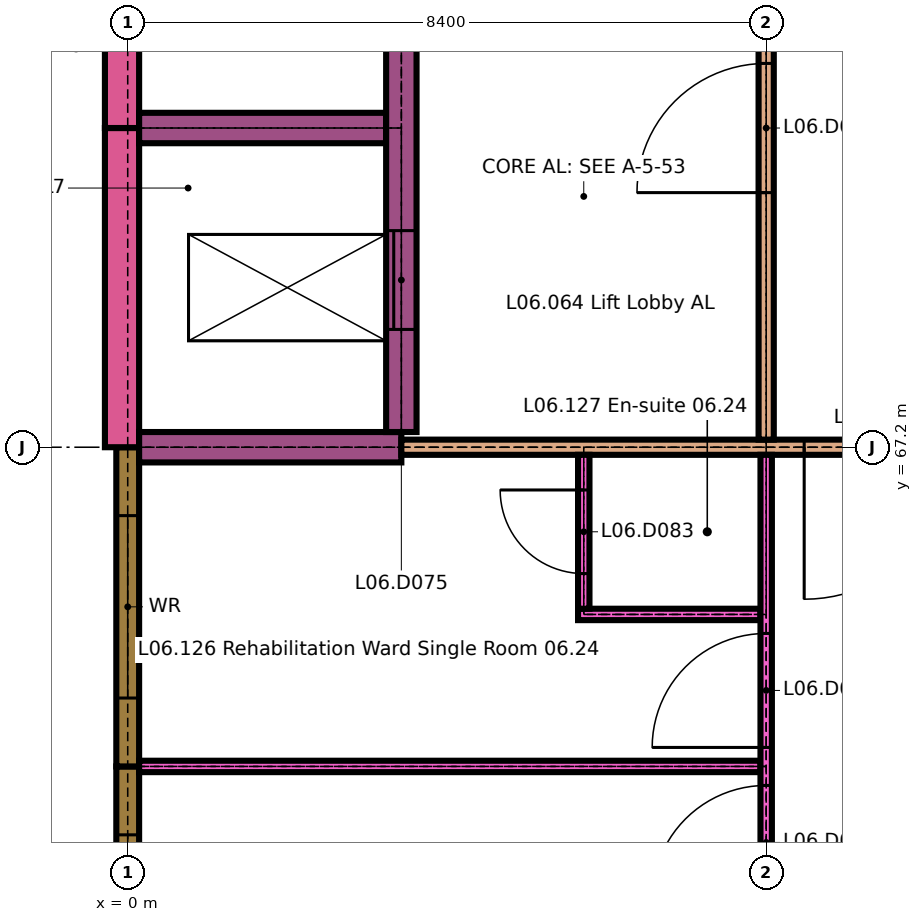
"""IFC4 building model, lengths in metres.
Left out: names, types, materials, properties, quantities, classifications, styles, units other than length and angle.
Written with IfcOpenShell. Run it as: python <this file> out.ifc"""

import sys

from ifc_helpers import new_model, si_unit, direction, frame, frame_2d, origin, place, context, subcontext, project, spatial, rectangle, extrude, element, fill, save


model = new_model("IFC4")
c1 = context("Model", 3, precision=1e-05, world=origin(), true_north=direction((0.0, 1.0)))
c2 = subcontext(c1, "Body", "Model", "MODEL_VIEW")
j1 = project(units=[si_unit("LENGTHUNIT", "METRE"), si_unit("PLANEANGLEUNIT", "RADIAN")], contexts=[c1])
p1 = place(None, origin())
s1 = spatial("IfcSite", under=j1, at=p1, CompositionType="ELEMENT")
p2 = place(p1, origin())
s2 = spatial("IfcBuilding", under=s1, at=p2, CompositionType="ELEMENT")
p3 = place(p2, frame((0.0, 0.0, 26.1)))
s3 = spatial("IfcBuildingStorey", under=s2, at=p3, CompositionType="ELEMENT", Elevation=26.1)
p4 = place(p3, frame((0.0, 59.15, 0.0), z_axis=(0.0, 0.0, 1.0), x_axis=(0.0, 1.0, 0.0)))
e1 = element("IfcWall", 1, at=p4, inside=s3, PredefinedType="SOLIDWALL", context=c2, shape_type="SweptSolid", body=[
    extrude(rectangle(XDim=3.85, YDim=0.3, at=frame_2d((1.925, 0.0))), origin(), (0.0, 0.0, 1.0), 2.9),
])
p5 = place(p4, frame((0.55, 0.0, 0.6)))
e2 = element("IfcOpeningElement", 2, at=p5, cuts=e1, PredefinedType="OPENING", context=c2, shape_type="SweptSolid", body=[
    extrude(rectangle(XDim=2.4, YDim=1.8, at=frame_2d((1.2, 0.9))), frame((0.0, 0.16, 0.0), z_axis=(0.0, -1.0, 0.0), x_axis=(1.0, 0.0, 0.0)), (0.0, 0.0, 1.0), 0.32),
])
p6 = place(p3, frame((0.0, 63.0, 0.0), z_axis=(0.0, 0.0, 1.0), x_axis=(0.0, 1.0, 0.0)))
e3 = element("IfcWall", 3, at=p6, inside=s3, PredefinedType="SOLIDWALL", context=c2, shape_type="SweptSolid", body=[
    extrude(rectangle(XDim=4.2, YDim=0.3, at=frame_2d((2.1, 0.0))), origin(), (0.0, 0.0, 1.0), 2.9),
])
p7 = place(p6, frame((0.9, 0.0, 0.6)))
e4 = element("IfcOpeningElement", 4, at=p7, cuts=e3, PredefinedType="OPENING", context=c2, shape_type="SweptSolid", body=[
    extrude(rectangle(XDim=2.4, YDim=1.8, at=frame_2d((1.2, 0.9))), frame((0.0, 0.16, 0.0), z_axis=(0.0, -1.0, 0.0), x_axis=(1.0, 0.0, 0.0)), (0.0, 0.0, 1.0), 0.32),
])
p8 = place(p3, frame((-0.075, 67.2, 0.0), z_axis=(0.0, 0.0, 1.0), x_axis=(0.0, 1.0, 0.0)))
e5 = element("IfcWall", 5, at=p8, inside=s3, PredefinedType="SOLIDWALL", context=c2, shape_type="SweptSolid", body=[
    extrude(rectangle(XDim=4.2, YDim=0.45, at=frame_2d((2.1, 0.0))), origin(), (0.0, 0.0, 1.0), 3.3),
])
p9 = place(p3, frame((-0.075, 71.4, 0.0), z_axis=(0.0, 0.0, 1.0), x_axis=(0.0, 1.0, 0.0)))
e6 = element("IfcWall", 6, at=p9, inside=s3, PredefinedType="SOLIDWALL", context=c2, shape_type="SweptSolid", body=[
    extrude(rectangle(XDim=4.2, YDim=0.45, at=frame_2d((2.1, 0.0))), origin(), (0.0, 0.0, 1.0), 3.3),
])
p10 = place(p3, frame((0.15, 63.0, 0.0), z_axis=(0.0, 0.0, 1.0), x_axis=(1.0, 0.0, 0.0)))
e7 = element("IfcWall", 7, at=p10, inside=s3, PredefinedType="PARTITIONING", context=c2, shape_type="SweptSolid", body=[
    extrude(rectangle(XDim=8.175, YDim=0.15, at=frame_2d((4.087, 0.0))), origin(), (0.0, 0.0, 1.0), 3.3),
])
p11 = place(p3, frame((5.925, 65.0, 0.0), z_axis=(0.0, 0.0, 1.0), x_axis=(1.0, 0.0, 0.0)))
e8 = element("IfcWall", 8, at=p11, inside=s3, PredefinedType="PARTITIONING", context=c2, shape_type="SweptSolid", body=[
    extrude(rectangle(XDim=2.4, YDim=0.15, at=frame_2d((1.2, 0.0))), origin(), (0.0, 0.0, 1.0), 3.3),
])
p12 = place(p3, frame((0.15, 67.2, 0.0), z_axis=(0.0, 0.0, 1.0), x_axis=(1.0, 0.0, 0.0)))
e9 = element("IfcWall", 9, at=p12, inside=s3, PredefinedType="SHEAR", context=c2, shape_type="SweptSolid", body=[
    extrude(rectangle(XDim=3.45, YDim=0.4, at=frame_2d((1.725, 0.0))), origin(), (0.0, 0.0, 1.0), 3.3),
])
p13 = place(p3, frame((3.6, 67.2, 0.0), z_axis=(0.0, 0.0, 1.0), x_axis=(1.0, 0.0, 0.0)))
e10 = element("IfcWall", 10, at=p13, inside=s3, PredefinedType="PARTITIONING", context=c2, shape_type="SweptSolid", body=[
    extrude(rectangle(XDim=12.85, YDim=0.2, at=frame_2d((6.425, 0.0))), origin(), (0.0, 0.0, 1.0), 3.3),
])
p14 = place(p13, frame((5.3, 0.0, 0.0)))
e11 = element("IfcOpeningElement", 11, at=p14, cuts=e10, PredefinedType="OPENING", context=c2, shape_type="SweptSolid", body=[
    extrude(rectangle(XDim=2.0, YDim=2.4, at=frame_2d((1.0, 1.2))), frame((0.0, 0.11, 0.0), z_axis=(0.0, -1.0, 0.0), x_axis=(1.0, 0.0, 0.0)), (0.0, 0.0, 1.0), 0.22),
])
p15 = place(p13, frame((10.525, 0.0, 0.0)))
e12 = element("IfcOpeningElement", 12, at=p15, cuts=e10, PredefinedType="OPENING", context=c2, shape_type="SweptSolid", body=[
    extrude(rectangle(XDim=2.0, YDim=2.4, at=frame_2d((1.0, 1.2))), frame((0.0, 0.11, 0.0), z_axis=(0.0, -1.0, 0.0), x_axis=(1.0, 0.0, 0.0)), (0.0, 0.0, 1.0), 0.22),
])
p16 = place(p3, frame((0.15, 71.4, 0.0), z_axis=(0.0, 0.0, 1.0), x_axis=(1.0, 0.0, 0.0)))
e13 = element("IfcWall", 13, at=p16, inside=s3, PredefinedType="SHEAR", context=c2, shape_type="SweptSolid", body=[
    extrude(rectangle(XDim=3.25, YDim=0.4, at=frame_2d((1.625, 0.0))), origin(), (0.0, 0.0, 1.0), 3.3),
])
p17 = place(p3, frame((3.6, 67.4, 0.0), z_axis=(0.0, 0.0, 1.0), x_axis=(0.0, 1.0, 0.0)))
e14 = element("IfcWall", 14, at=p17, inside=s3, PredefinedType="SHEAR", context=c2, shape_type="SweptSolid", body=[
    extrude(rectangle(XDim=8.0, YDim=0.4, at=frame_2d((4.0, 0.0))), origin(), (0.0, 0.0, 1.0), 3.3),
])
p18 = place(p17, frame((1.35, 0.0, 0.0)))
e15 = element("IfcOpeningElement", 15, at=p18, cuts=e14, PredefinedType="OPENING", context=c2, shape_type="SweptSolid", body=[
    extrude(rectangle(XDim=1.3, YDim=2.1, at=frame_2d((0.65, 1.05))), frame((0.0, 0.21, 0.0), z_axis=(0.0, -1.0, 0.0), x_axis=(1.0, 0.0, 0.0)), (0.0, 0.0, 1.0), 0.42),
])
p19 = place(p17, frame((5.45, 0.0, 0.0)))
e16 = element("IfcOpeningElement", 16, at=p19, cuts=e14, PredefinedType="OPENING", context=c2, shape_type="SweptSolid", body=[
    extrude(rectangle(XDim=1.1, YDim=2.1, at=frame_2d((0.55, 1.05))), frame((0.0, 0.21, 0.0), z_axis=(0.0, -1.0, 0.0), x_axis=(1.0, 0.0, 0.0)), (0.0, 0.0, 1.0), 0.42),
])
p20 = place(p3, frame((6.0, 65.075, 0.0), z_axis=(0.0, 0.0, 1.0), x_axis=(0.0, 1.0, 0.0)))
e17 = element("IfcWall", 17, at=p20, inside=s3, PredefinedType="PARTITIONING", context=c2, shape_type="SweptSolid", body=[
    extrude(rectangle(XDim=2.025, YDim=0.15, at=frame_2d((1.013, 0.0))), origin(), (0.0, 0.0, 1.0), 3.3),
])
p21 = place(p20, frame((0.462, 0.0, 0.0)))
e18 = element("IfcOpeningElement", 18, at=p21, cuts=e17, PredefinedType="OPENING", context=c2, shape_type="SweptSolid", body=[
    extrude(rectangle(XDim=1.1, YDim=2.1, at=frame_2d((0.55, 1.05))), frame((0.0, 0.085, 0.0), z_axis=(0.0, -1.0, 0.0), x_axis=(1.0, 0.0, 0.0)), (0.0, 0.0, 1.0), 0.17),
])
p22 = place(p3, frame((8.4, 59.15, 0.0), z_axis=(0.0, 0.0, 1.0), x_axis=(0.0, 1.0, 0.0)))
e19 = element("IfcWall", 19, at=p22, inside=s3, PredefinedType="PARTITIONING", context=c2, shape_type="SweptSolid", body=[
    extrude(rectangle(XDim=7.95, YDim=0.15, at=frame_2d((3.975, 0.0))), origin(), (0.0, 0.0, 1.0), 3.3),
])
p23 = place(p22, frame((2.1, 0.0, 0.0)))
e20 = element("IfcOpeningElement", 20, at=p23, cuts=e19, PredefinedType="OPENING", context=c2, shape_type="SweptSolid", body=[
    extrude(rectangle(XDim=1.5, YDim=2.4, at=frame_2d((0.75, 1.2))), frame((0.0, 0.085, 0.0), z_axis=(0.0, -1.0, 0.0), x_axis=(1.0, 0.0, 0.0)), (0.0, 0.0, 1.0), 0.17),
])
p24 = place(p22, frame((4.1, 0.0, 0.0)))
e21 = element("IfcOpeningElement", 21, at=p24, cuts=e19, PredefinedType="OPENING", context=c2, shape_type="SweptSolid", body=[
    extrude(rectangle(XDim=1.5, YDim=2.4, at=frame_2d((0.75, 1.2))), frame((0.0, 0.085, 0.0), z_axis=(0.0, -1.0, 0.0), x_axis=(1.0, 0.0, 0.0)), (0.0, 0.0, 1.0), 0.17),
])
p25 = place(p3, frame((8.4, 67.3, 0.0), z_axis=(0.0, 0.0, 1.0), x_axis=(0.0, 1.0, 0.0)))
e22 = element("IfcWall", 22, at=p25, inside=s3, PredefinedType="PARTITIONING", context=c2, shape_type="SweptSolid", body=[
    extrude(rectangle(XDim=8.2, YDim=0.2, at=frame_2d((4.1, 0.0))), origin(), (0.0, 0.0, 1.0), 3.3),
])
p26 = place(p25, frame((3.25, 0.0, 0.0)))
e23 = element("IfcOpeningElement", 23, at=p26, cuts=e22, PredefinedType="OPENING", context=c2, shape_type="SweptSolid", body=[
    extrude(rectangle(XDim=1.7, YDim=2.4, at=frame_2d((0.85, 1.2))), frame((0.0, 0.11, 0.0), z_axis=(0.0, -1.0, 0.0), x_axis=(1.0, 0.0, 0.0)), (0.0, 0.0, 1.0), 0.22),
])
p27 = place(p5, origin())
e24 = element("IfcWindow", 24, at=p27, inside=s3, PartitioningType="DOUBLE_PANEL_VERTICAL", PredefinedType="WINDOW", context=c2, shape_type="SweptSolid", body=[
    extrude(rectangle(XDim=2.4, YDim=1.8, at=frame_2d((1.2, 0.9))), frame((0.0, 0.03, 0.0), z_axis=(0.0, -1.0, 0.0), x_axis=(1.0, 0.0, 0.0)), (0.0, 0.0, 1.0), 0.06),
])
fill(e2, e24)
p28 = place(p7, origin())
e25 = element("IfcWindow", 25, at=p28, inside=s3, PartitioningType="DOUBLE_PANEL_VERTICAL", PredefinedType="WINDOW", context=c2, shape_type="SweptSolid", body=[
    extrude(rectangle(XDim=2.4, YDim=1.8, at=frame_2d((1.2, 0.9))), frame((0.0, 0.03, 0.0), z_axis=(0.0, -1.0, 0.0), x_axis=(1.0, 0.0, 0.0)), (0.0, 0.0, 1.0), 0.06),
])
fill(e4, e25)
p29 = place(p14, origin())
e26 = element("IfcDoor", 26, at=p29, inside=s3, OperationType="SINGLE_SWING_LEFT", PredefinedType="DOOR", context=c2, shape_type="SweptSolid", body=[
    extrude(rectangle(XDim=2.0, YDim=2.4, at=frame_2d((1.0, 1.2))), frame((0.0, 0.03, 0.0), z_axis=(0.0, -1.0, 0.0), x_axis=(1.0, 0.0, 0.0)), (0.0, 0.0, 1.0), 0.06),
])
fill(e11, e26)
p30 = place(p18, origin())
e27 = element("IfcDoor", 27, at=p30, inside=s3, OperationType="SLIDING_TO_LEFT", PredefinedType="DOOR", context=c2, shape_type="SweptSolid", body=[
    extrude(rectangle(XDim=1.3, YDim=2.1, at=frame_2d((0.65, 1.05))), frame((0.0, 0.025, 0.0), z_axis=(0.0, -1.0, 0.0), x_axis=(1.0, 0.0, 0.0)), (0.0, 0.0, 1.0), 0.05),
])
fill(e15, e27)
p31 = place(p21, origin())
e28 = element("IfcDoor", 28, at=p31, inside=s3, OperationType="SINGLE_SWING_LEFT", PredefinedType="DOOR", context=c2, shape_type="SweptSolid", body=[
    extrude(rectangle(XDim=1.1, YDim=2.1, at=frame_2d((0.55, 1.05))), frame((0.0, 0.025, 0.0), z_axis=(0.0, -1.0, 0.0), x_axis=(1.0, 0.0, 0.0)), (0.0, 0.0, 1.0), 0.05),
])
fill(e18, e28)
p32 = place(p23, origin())
e29 = element("IfcDoor", 29, at=p32, inside=s3, OperationType="SINGLE_SWING_RIGHT", PredefinedType="DOOR", context=c2, shape_type="SweptSolid", body=[
    extrude(rectangle(XDim=1.5, YDim=2.4, at=frame_2d((0.75, 1.2))), frame((0.0, 0.03, 0.0), z_axis=(0.0, -1.0, 0.0), x_axis=(1.0, 0.0, 0.0)), (0.0, 0.0, 1.0), 0.06),
])
fill(e20, e29)
p33 = place(p24, origin())
e30 = element("IfcDoor", 30, at=p33, inside=s3, OperationType="SINGLE_SWING_RIGHT", PredefinedType="DOOR", context=c2, shape_type="SweptSolid", body=[
    extrude(rectangle(XDim=1.5, YDim=2.4, at=frame_2d((0.75, 1.2))), frame((0.0, 0.03, 0.0), z_axis=(0.0, -1.0, 0.0), x_axis=(1.0, 0.0, 0.0)), (0.0, 0.0, 1.0), 0.06),
])
fill(e21, e30)
p34 = place(p26, origin())
e31 = element("IfcDoor", 31, at=p34, inside=s3, OperationType="SINGLE_SWING_RIGHT", PredefinedType="DOOR", context=c2, shape_type="SweptSolid", body=[
    extrude(rectangle(XDim=1.7, YDim=2.4, at=frame_2d((0.85, 1.2))), frame((0.0, 0.025, 0.0), z_axis=(0.0, -1.0, 0.0), x_axis=(1.0, 0.0, 0.0)), (0.0, 0.0, 1.0), 0.05),
])
fill(e23, e31)
save(model, sys.argv[1])
